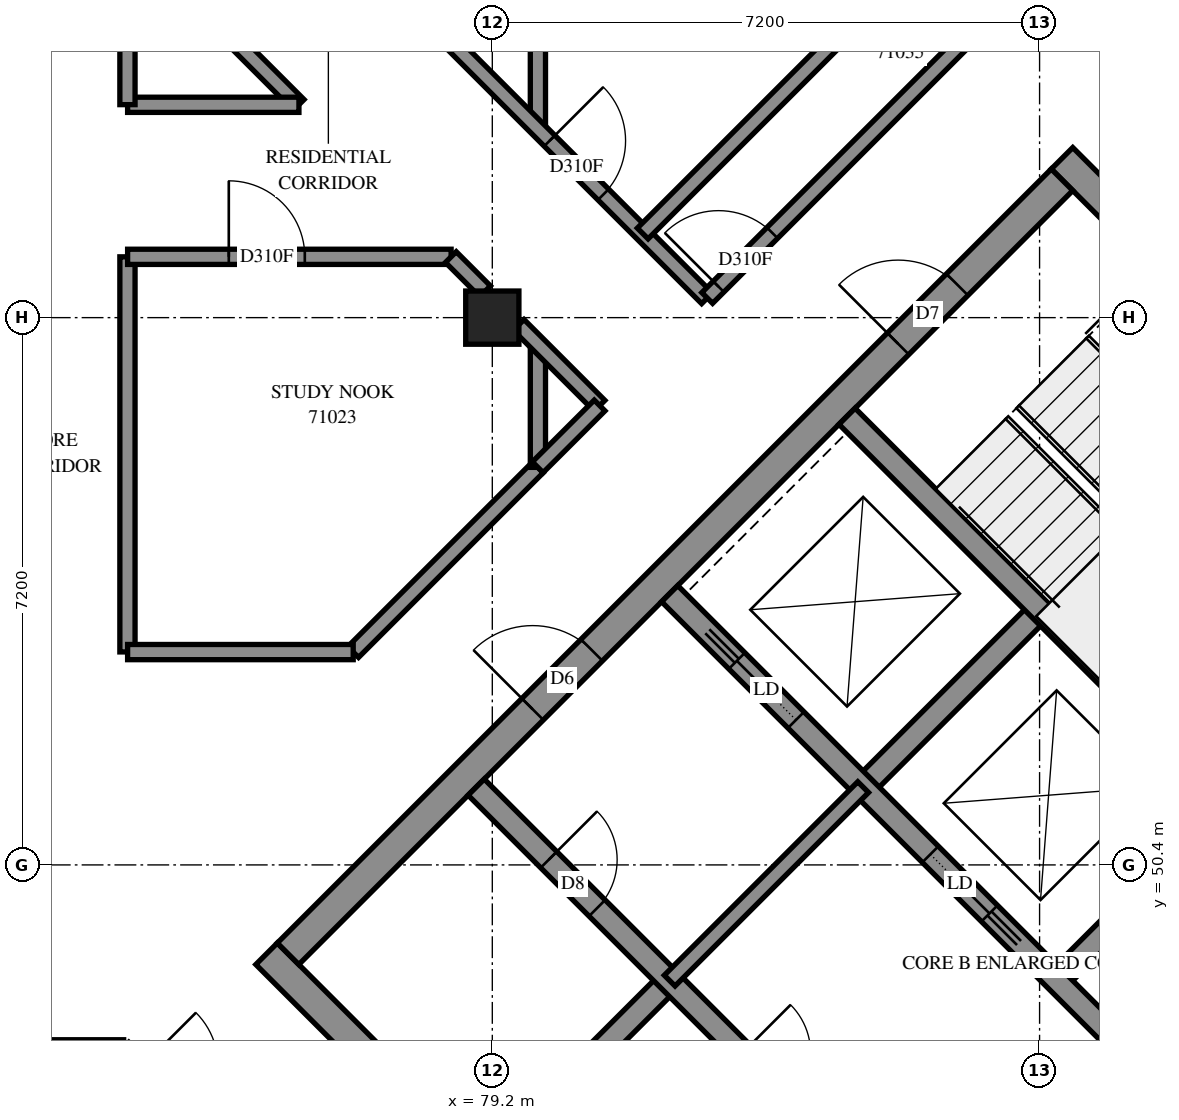
"""IFC4 building model, lengths in metres.
Left out: names, types, materials, properties, quantities, classifications, styles, units other than length and angle.
Written with IfcOpenShell. Run it as: python <this file> out.ifc"""

import sys

from ifc_helpers import new_model, si_unit, direction, frame, frame_2d, origin, origin_2d, place, context, subcontext, project, spatial, rectangle, extrude, element, fill, save


model = new_model("IFC4")
c1 = context("Model", 3, precision=1e-05, world=origin(), true_north=direction((0.0, 1.0)))
c2 = subcontext(c1, "Body", "Model", "MODEL_VIEW")
j1 = project(units=[si_unit("LENGTHUNIT", "METRE"), si_unit("PLANEANGLEUNIT", "RADIAN")], contexts=[c1])
p1 = place(None, origin())
s1 = spatial("IfcSite", under=j1, at=p1, CompositionType="ELEMENT")
p2 = place(p1, origin())
s2 = spatial("IfcBuilding", under=s1, at=p2, CompositionType="ELEMENT")
p3 = place(p2, frame((0.0, 0.0, 260.8)))
s3 = spatial("IfcBuildingStorey", under=s2, at=p3, CompositionType="ELEMENT", Elevation=260.8)
p4 = place(p3, frame((79.2, 57.6, 0.0), z_axis=(0.0, 0.0, 1.0), x_axis=(1.0, 0.0, 0.0)))
e1 = element("IfcColumn", 1, at=p4, inside=s3, PredefinedType="COLUMN", context=c2, shape_type="SweptSolid", body=[
    extrude(rectangle(XDim=0.7, YDim=0.7, at=origin_2d()), origin(), (0.0, 0.0, 1.0), 3.1),
])
p5 = place(p3, frame((76.23, 49.231, -0.3), z_axis=(0.0, 0.0, 1.0), x_axis=(0.7071034917, -0.7071100706, 0.0)))
e2 = element("IfcWall", 2, at=p5, inside=s3, PredefinedType="SHEAR", context=c2, shape_type="SweptSolid", body=[
    extrude(rectangle(XDim=15.2, YDim=0.4, at=frame_2d((7.6, 0.0))), origin(), (0.0, 0.0, 1.0), 2.7),
])
p6 = place(p3, frame((86.695, 59.696, -0.3), z_axis=(0.0, 0.0, 1.0), x_axis=(0.7071100706, -0.7071034917, 0.0)))
e3 = element("IfcWall", 3, at=p6, inside=s3, PredefinedType="SHEAR", context=c2, shape_type="SweptSolid", body=[
    extrude(rectangle(XDim=15.2, YDim=0.4, at=frame_2d((7.6, 0.0))), origin(), (0.0, 0.0, 1.0), 2.7),
])
p7 = place(p6, frame((10.4, 0.0, 0.3)))
e4 = element("IfcOpeningElement", 4, at=p7, cuts=e3, PredefinedType="OPENING", context=c2, shape_type="SweptSolid", body=[
    extrude(rectangle(XDim=0.8, YDim=2.1, at=frame_2d((0.4, 1.05))), frame((0.0, 0.21, 0.0), z_axis=(0.0, -1.0, 0.0), x_axis=(1.0, 0.0, 0.0)), (0.0, 0.0, 1.0), 0.42),
])
p8 = place(p3, frame((76.513, 49.231, -0.3), z_axis=(0.0, 0.0, 1.0), x_axis=(0.7071067812, 0.7071067812, 0.0)))
e5 = element("IfcWall", 5, at=p8, inside=s3, PredefinedType="SHEAR", context=c2, shape_type="SweptSolid", body=[
    extrude(rectangle(XDim=14.4, YDim=0.4, at=frame_2d((7.2, 0.0))), origin(), (0.0, 0.0, 1.0), 2.7),
])
p9 = place(p8, frame((4.55, 0.0, 0.3)))
e6 = element("IfcOpeningElement", 6, at=p9, cuts=e5, PredefinedType="OPENING", context=c2, shape_type="SweptSolid", body=[
    extrude(rectangle(XDim=1.1, YDim=2.1, at=frame_2d((0.55, 1.05))), frame((0.0, 0.21, 0.0), z_axis=(0.0, -1.0, 0.0), x_axis=(1.0, 0.0, 0.0)), (0.0, 0.0, 1.0), 0.42),
])
p10 = place(p8, frame((11.35, 0.0, 0.3)))
e7 = element("IfcOpeningElement", 7, at=p10, cuts=e5, PredefinedType="OPENING", context=c2, shape_type="SweptSolid", body=[
    extrude(rectangle(XDim=1.1, YDim=2.1, at=frame_2d((0.55, 1.05))), frame((0.0, 0.21, 0.0), z_axis=(0.0, -1.0, 0.0), x_axis=(1.0, 0.0, 0.0)), (0.0, 0.0, 1.0), 0.42),
])
p11 = place(p3, frame((86.978, 38.766, -0.3), z_axis=(0.0, 0.0, 1.0), x_axis=(0.7071067812, 0.7071067812, 0.0)))
e8 = element("IfcWall", 8, at=p11, inside=s3, PredefinedType="SHEAR", context=c2, shape_type="SweptSolid", body=[
    extrude(rectangle(XDim=14.4, YDim=0.4, at=frame_2d((7.2, 0.0))), origin(), (0.0, 0.0, 1.0), 2.7),
])
p12 = place(p11, frame((4.55, 0.0, 0.3)))
e9 = element("IfcOpeningElement", 9, at=p12, cuts=e8, PredefinedType="OPENING", context=c2, shape_type="SweptSolid", body=[
    extrude(rectangle(XDim=1.1, YDim=2.1, at=frame_2d((0.55, 1.05))), frame((0.0, 0.21, 0.0), z_axis=(0.0, -1.0, 0.0), x_axis=(1.0, 0.0, 0.0)), (0.0, 0.0, 1.0), 0.42),
])
p13 = place(p11, frame((11.35, 0.0, 0.3)))
e10 = element("IfcOpeningElement", 10, at=p13, cuts=e8, PredefinedType="OPENING", context=c2, shape_type="SweptSolid", body=[
    extrude(rectangle(XDim=1.1, YDim=2.1, at=frame_2d((0.55, 1.05))), frame((0.0, 0.21, 0.0), z_axis=(0.0, -1.0, 0.0), x_axis=(1.0, 0.0, 0.0)), (0.0, 0.0, 1.0), 0.42),
])
for number, where, z_axis, x_axis in (
    (11, (79.2, 46.544, 0.0), (0.0, 0.0, 1.0), (0.707, 0.707, 0.0)),
    (12, (84.079, 51.423, 0.0), (0.0, 0.0, 1.0), (0.707, 0.707, 0.0)),
):
    element("IfcWall", number, at=place(p3, frame(where, z_axis=z_axis, x_axis=x_axis)), inside=s3, PredefinedType="SOLIDWALL", context=c2, shape_type="SweptSolid", body=[
        extrude(rectangle(XDim=3.3, YDim=0.3, at=frame_2d((1.65, 0.0))), origin(), (0.0, 0.0, 1.0), 3.1),
    ])
p14 = place(p3, frame((86.625, 48.878, 0.0), z_axis=(0.0, 0.0, 1.0), x_axis=(0.7071067812, 0.7071067812, 0.0)))
e13 = element("IfcWall", 13, at=p14, inside=s3, PredefinedType="SOLIDWALL", context=c2, shape_type="SweptSolid", body=[
    extrude(rectangle(XDim=3.3, YDim=0.3, at=frame_2d((1.65, 0.0))), origin(), (0.0, 0.0, 1.0), 3.1),
])
p15 = place(p3, frame((78.988, 51.423, 0.0), z_axis=(0.0, 0.0, 1.0), x_axis=(0.7071067812, -0.7071067812, 0.0)))
e14 = element("IfcWall", 14, at=p15, inside=s3, PredefinedType="SOLIDWALL", context=c2, shape_type="SweptSolid", body=[
    extrude(rectangle(XDim=14.4, YDim=0.3, at=frame_2d((7.2, 0.0))), origin(), (0.0, 0.0, 1.0), 3.1),
])
p16 = place(p15, frame((1.35, 0.0, 0.0)))
e15 = element("IfcOpeningElement", 15, at=p16, cuts=e14, PredefinedType="OPENING", context=c2, shape_type="SweptSolid", body=[
    extrude(rectangle(XDim=0.9, YDim=2.1, at=frame_2d((0.45, 1.05))), frame((0.0, 0.16, 0.0), z_axis=(0.0, -1.0, 0.0), x_axis=(1.0, 0.0, 0.0)), (0.0, 0.0, 1.0), 0.32),
])
p17 = place(p15, frame((4.95, 0.0, 0.0)))
e16 = element("IfcOpeningElement", 16, at=p17, cuts=e14, PredefinedType="OPENING", context=c2, shape_type="SweptSolid", body=[
    extrude(rectangle(XDim=0.9, YDim=2.1, at=frame_2d((0.45, 1.05))), frame((0.0, 0.16, 0.0), z_axis=(0.0, -1.0, 0.0), x_axis=(1.0, 0.0, 0.0)), (0.0, 0.0, 1.0), 0.32),
])
p18 = place(p15, frame((8.55, 0.0, 0.0)))
e17 = element("IfcOpeningElement", 17, at=p18, cuts=e14, PredefinedType="OPENING", context=c2, shape_type="SweptSolid", body=[
    extrude(rectangle(XDim=0.9, YDim=2.1, at=frame_2d((0.45, 1.05))), frame((0.0, 0.16, 0.0), z_axis=(0.0, -1.0, 0.0), x_axis=(1.0, 0.0, 0.0)), (0.0, 0.0, 1.0), 0.32),
])
p19 = place(p15, frame((12.05, 0.0, 0.0)))
e18 = element("IfcOpeningElement", 18, at=p19, cuts=e14, PredefinedType="OPENING", context=c2, shape_type="SweptSolid", body=[
    extrude(rectangle(XDim=1.1, YDim=2.1, at=frame_2d((0.55, 1.05))), frame((0.0, 0.16, 0.0), z_axis=(0.0, -1.0, 0.0), x_axis=(1.0, 0.0, 0.0)), (0.0, 0.0, 1.0), 0.32),
])
p20 = place(p3, frame((81.534, 53.969, 0.0), z_axis=(0.0, 0.0, 1.0), x_axis=(0.707103309, -0.7071102534, 0.0)))
e19 = element("IfcWall", 19, at=p20, inside=s3, PredefinedType="SOLIDWALL", context=c2, shape_type="SweptSolid", body=[
    extrude(rectangle(XDim=14.4, YDim=0.3, at=frame_2d((7.2, 0.0))), origin(), (0.0, 0.0, 1.0), 3.1),
])
p21 = place(p20, frame((8.55, 0.0, 0.0)))
e20 = element("IfcOpeningElement", 20, at=p21, cuts=e19, PredefinedType="OPENING", context=c2, shape_type="SweptSolid", body=[
    extrude(rectangle(XDim=0.9, YDim=2.1, at=frame_2d((0.45, 1.05))), frame((0.0, 0.16, 0.0), z_axis=(0.0, -1.0, 0.0), x_axis=(1.0, 0.0, 0.0)), (0.0, 0.0, 1.0), 0.32),
])
p22 = place(p20, frame((1.25, 0.0, 0.0)))
e21 = element("IfcOpeningElement", 21, at=p22, cuts=e19, PredefinedType="OPENING", context=c2, shape_type="SweptSolid", body=[
    extrude(rectangle(XDim=1.1, YDim=2.1, at=frame_2d((0.55, 1.05))), frame((0.0, 0.16, 0.0), z_axis=(0.0, -1.0, 0.0), x_axis=(1.0, 0.0, 0.0)), (0.0, 0.0, 1.0), 0.32),
])
p23 = place(p20, frame((4.85, 0.0, 0.0)))
e22 = element("IfcOpeningElement", 22, at=p23, cuts=e19, PredefinedType="OPENING", context=c2, shape_type="SweptSolid", body=[
    extrude(rectangle(XDim=1.1, YDim=2.1, at=frame_2d((0.55, 1.05))), frame((0.0, 0.16, 0.0), z_axis=(0.0, -1.0, 0.0), x_axis=(1.0, 0.0, 0.0)), (0.0, 0.0, 1.0), 0.32),
])
p24 = place(p20, frame((12.05, 0.0, 0.0)))
e23 = element("IfcOpeningElement", 23, at=p24, cuts=e19, PredefinedType="OPENING", context=c2, shape_type="SweptSolid", body=[
    extrude(rectangle(XDim=1.1, YDim=2.1, at=frame_2d((0.55, 1.05))), frame((0.0, 0.16, 0.0), z_axis=(0.0, -1.0, 0.0), x_axis=(1.0, 0.0, 0.0)), (0.0, 0.0, 1.0), 0.32),
])
p25 = place(p3, frame((83.867, 56.302, 0.0), z_axis=(0.0, 0.0, 1.0), x_axis=(0.7071137256, -0.7070998367, 0.0)))
e24 = element("IfcWall", 24, at=p25, inside=s3, PredefinedType="SOLIDWALL", context=c2, shape_type="SweptSolid", body=[
    extrude(rectangle(XDim=7.2, YDim=0.3, at=frame_2d((3.6, 0.0))), origin(), (0.0, 0.0, 1.0), 3.1),
])
p26 = place(p3, frame((81.534, 48.878, 0.0), z_axis=(0.0, 0.0, 1.0), x_axis=(0.707092892, 0.7071206701, 0.0)))
e25 = element("IfcWall", 25, at=p26, inside=s3, PredefinedType="PARTITIONING", context=c2, shape_type="SweptSolid", body=[
    extrude(rectangle(XDim=3.6, YDim=0.2, at=frame_2d((1.8, 0.0))), origin(), (0.0, 0.0, 1.0), 3.1),
])
p27 = place(p3, frame((55.2, 48.0, 0.0), z_axis=(0.0, 0.0, 1.0), x_axis=(1.0, 0.0, 0.0)))
e26 = element("IfcWall", 26, at=p27, inside=s3, PredefinedType="PARTITIONING", context=c2, shape_type="SweptSolid", body=[
    extrude(rectangle(XDim=19.15, YDim=0.2, at=frame_2d((9.575, 0.0))), origin(), (0.0, 0.0, 1.0), 3.1),
])
p28 = place(p27, frame((6.343, 0.0, 0.0)))
e27 = element("IfcOpeningElement", 27, at=p28, cuts=e26, PredefinedType="OPENING", context=c2, shape_type="SweptSolid", body=[
    extrude(rectangle(XDim=0.9, YDim=2.1, at=frame_2d((0.45, 1.05))), frame((0.0, 0.11, 0.0), z_axis=(0.0, -1.0, 0.0), x_axis=(1.0, 0.0, 0.0)), (0.0, 0.0, 1.0), 0.22),
])
p29 = place(p27, frame((11.633, 0.0, 0.0)))
e28 = element("IfcOpeningElement", 28, at=p29, cuts=e26, PredefinedType="OPENING", context=c2, shape_type="SweptSolid", body=[
    extrude(rectangle(XDim=1.0, YDim=2.1, at=frame_2d((0.5, 1.05))), frame((0.0, 0.11, 0.0), z_axis=(0.0, -1.0, 0.0), x_axis=(1.0, 0.0, 0.0)), (0.0, 0.0, 1.0), 0.22),
])
p30 = place(p27, frame((13.707, 0.0, 0.0)))
e29 = element("IfcOpeningElement", 29, at=p30, cuts=e26, PredefinedType="OPENING", context=c2, shape_type="SweptSolid", body=[
    extrude(rectangle(XDim=1.0, YDim=2.1, at=frame_2d((0.5, 1.05))), frame((0.0, 0.11, 0.0), z_axis=(0.0, -1.0, 0.0), x_axis=(1.0, 0.0, 0.0)), (0.0, 0.0, 1.0), 0.22),
])
p31 = place(p3, frame((79.8, 60.086, 0.0), z_axis=(0.0, 0.0, 1.0), x_axis=(0.0, 1.0, 0.0)))
e30 = element("IfcWall", 30, at=p31, inside=s3, PredefinedType="PARTITIONING", context=c2, shape_type="SweptSolid", body=[
    extrude(rectangle(XDim=12.914, YDim=0.2, at=frame_2d((6.457, 0.0))), origin(), (0.0, 0.0, 1.0), 3.1),
])
p32 = place(p3, frame((74.397, 65.483, 0.0), z_axis=(0.0, 0.0, 1.0), x_axis=(0.7071067812, -0.7071067812, 0.0)))
e31 = element("IfcWall", 31, at=p32, inside=s3, PredefinedType="PARTITIONING", context=c2, shape_type="SweptSolid", body=[
    extrude(rectangle(XDim=10.788, YDim=0.2, at=frame_2d((5.394, 0.0))), origin(), (0.0, 0.0, 1.0), 3.1),
])
p33 = place(p32, frame((5.083, 0.0, 0.0)))
e32 = element("IfcOpeningElement", 32, at=p33, cuts=e31, PredefinedType="OPENING", context=c2, shape_type="SweptSolid", body=[
    extrude(rectangle(XDim=1.0, YDim=2.1, at=frame_2d((0.5, 1.05))), frame((0.0, 0.11, 0.0), z_axis=(0.0, -1.0, 0.0), x_axis=(1.0, 0.0, 0.0)), (0.0, 0.0, 1.0), 0.22),
])
p34 = place(p32, frame((7.858, 0.0, 0.0)))
e33 = element("IfcOpeningElement", 33, at=p34, cuts=e31, PredefinedType="OPENING", context=c2, shape_type="SweptSolid", body=[
    extrude(rectangle(XDim=1.0, YDim=2.1, at=frame_2d((0.5, 1.05))), frame((0.0, 0.11, 0.0), z_axis=(0.0, -1.0, 0.0), x_axis=(1.0, 0.0, 0.0)), (0.0, 0.0, 1.0), 0.22),
])
p35 = place(p3, frame((81.179, 58.707, 0.0), z_axis=(0.0, 0.0, 1.0), x_axis=(0.7071067812, 0.7071067812, 0.0)))
e34 = element("IfcWall", 34, at=p35, inside=s3, PredefinedType="PARTITIONING", context=c2, shape_type="SweptSolid", body=[
    extrude(rectangle(XDim=8.98, YDim=0.2, at=frame_2d((4.49, 0.0))), origin(), (0.0, 0.0, 1.0), 3.1),
])
p36 = place(p3, frame((82.028, 57.858, 0.0), z_axis=(0.0, 0.0, 1.0), x_axis=(0.7071067812, 0.7071067812, 0.0)))
e35 = element("IfcWall", 35, at=p36, inside=s3, PredefinedType="PARTITIONING", context=c2, shape_type="SweptSolid", body=[
    extrude(rectangle(XDim=6.8, YDim=0.2, at=frame_2d((3.4, 0.0))), origin(), (0.0, 0.0, 1.0), 3.1),
])
p37 = place(p36, frame((0.211, 0.0, 0.0)))
e36 = element("IfcOpeningElement", 36, at=p37, cuts=e35, PredefinedType="OPENING", context=c2, shape_type="SweptSolid", body=[
    extrude(rectangle(XDim=1.0, YDim=2.1, at=frame_2d((0.5, 1.05))), frame((0.0, 0.11, 0.0), z_axis=(0.0, -1.0, 0.0), x_axis=(1.0, 0.0, 0.0)), (0.0, 0.0, 1.0), 0.22),
])
p38 = place(p3, frame((74.4, 53.202, 0.0), z_axis=(0.0, 0.0, 1.0), x_axis=(0.0, 1.0, 0.0)))
e37 = element("IfcWall", 37, at=p38, inside=s3, PredefinedType="PARTITIONING", context=c2, shape_type="SweptSolid", body=[
    extrude(rectangle(XDim=5.198, YDim=0.2, at=frame_2d((2.599, 0.0))), origin(), (0.0, 0.0, 1.0), 3.1),
])
p39 = place(p3, frame((74.402, 58.4, 0.0), z_axis=(0.0, 0.0, 1.0), x_axis=(1.0, 0.0, 0.0)))
e38 = element("IfcWall", 38, at=p39, inside=s3, PredefinedType="PARTITIONING", context=c2, shape_type="SweptSolid", body=[
    extrude(rectangle(XDim=4.256, YDim=0.2, at=frame_2d((2.128, 0.0))), origin(), (0.0, 0.0, 1.0), 3.1),
])
p40 = place(p39, frame((1.331, 0.0, 0.0)))
e39 = element("IfcOpeningElement", 39, at=p40, cuts=e38, PredefinedType="OPENING", context=c2, shape_type="SweptSolid", body=[
    extrude(rectangle(XDim=1.0, YDim=2.1, at=frame_2d((0.5, 1.05))), frame((0.0, 0.11, 0.0), z_axis=(0.0, -1.0, 0.0), x_axis=(1.0, 0.0, 0.0)), (0.0, 0.0, 1.0), 0.22),
])
p41 = place(p3, frame((77.37, 53.2, 0.0), z_axis=(0.0, 0.0, 1.0), x_axis=(0.7071067812, 0.7071067812, 0.0)))
e40 = element("IfcWall", 40, at=p41, inside=s3, PredefinedType="PARTITIONING", context=c2, shape_type="SweptSolid", body=[
    extrude(rectangle(XDim=3.437, YDim=0.2, at=frame_2d((1.718, 0.0))), origin(), (0.0, 0.0, 1.0), 3.1),
])
p42 = place(p3, frame((74.399, 62.653, 0.0), z_axis=(0.0, 0.0, 1.0), x_axis=(0.7071067812, -0.7071067812, 0.0)))
e41 = element("IfcWall", 41, at=p42, inside=s3, PredefinedType="PARTITIONING", context=c2, shape_type="SweptSolid", body=[
    extrude(rectangle(XDim=3.188, YDim=0.2, at=frame_2d((1.594, 0.0))), origin(), (0.0, 0.0, 1.0), 3.1),
])
p43 = place(p3, frame((74.402, 53.2, 0.0), z_axis=(0.0, 0.0, 1.0), x_axis=(1.0, 0.0, 0.0)))
e42 = element("IfcWall", 42, at=p43, inside=s3, PredefinedType="PARTITIONING", context=c2, shape_type="SweptSolid", body=[
    extrude(rectangle(XDim=2.968, YDim=0.2, at=frame_2d((1.484, 0.0))), origin(), (0.0, 0.0, 1.0), 3.1),
])
p44 = place(p3, frame((86.833, 62.663, 0.0), z_axis=(0.0, 0.0, 1.0), x_axis=(0.7075233388, -0.706689978, 0.0)))
e43 = element("IfcWall", 43, at=p44, inside=s3, PredefinedType="PARTITIONING", context=c2, shape_type="SweptSolid", body=[
    extrude(rectangle(XDim=2.4, YDim=0.2, at=frame_2d((1.2, 0.0))), origin(), (0.0, 0.0, 1.0), 3.1),
])
for number, where, z_axis, x_axis in (
    (44, (74.402, 60.4, 0.0), (0.0, 0.0, 1.0), (1.0, 0.0, 0.0)),
    (45, (74.4, 60.402, 0.0), (0.0, 0.0, 1.0), (0.0, 1.0, 0.0)),
):
    element("IfcWall", number, at=place(p3, frame(where, z_axis=z_axis, x_axis=x_axis)), inside=s3, PredefinedType="PARTITIONING", context=c2, shape_type="SweptSolid", body=[
        extrude(rectangle(XDim=2.254, YDim=0.2, at=frame_2d((1.127, 0.0))), origin(), (0.0, 0.0, 1.0), 3.1),
    ])
p45 = place(p3, frame((79.8, 55.63, 0.0), z_axis=(0.0, 0.0, 1.0), x_axis=(0.0, 1.0, 0.0)))
e46 = element("IfcWall", 46, at=p45, inside=s3, PredefinedType="PARTITIONING", context=c2, shape_type="SweptSolid", body=[
    extrude(rectangle(XDim=1.628, YDim=0.2, at=frame_2d((0.814, 0.0))), origin(), (0.0, 0.0, 1.0), 3.1),
])
p46 = place(p3, frame((79.547, 57.505, 0.0), z_axis=(0.0, 0.0, 1.0), x_axis=(0.7071067812, -0.7071067812, 0.0)))
e47 = element("IfcWall", 47, at=p46, inside=s3, PredefinedType="PARTITIONING", context=c2, shape_type="SweptSolid", body=[
    extrude(rectangle(XDim=1.505, YDim=0.2, at=frame_2d((0.752, 0.0))), origin(), (0.0, 0.0, 1.0), 3.1),
])
p47 = place(p3, frame((79.798, 55.632, 0.0), z_axis=(0.0, 0.0, 1.0), x_axis=(0.7079759957, 0.7062364969, 0.0)))
e48 = element("IfcWall", 48, at=p47, inside=s3, PredefinedType="PARTITIONING", context=c2, shape_type="SweptSolid", body=[
    extrude(rectangle(XDim=1.15, YDim=0.2, at=frame_2d((0.575, 0.0))), origin(), (0.0, 0.0, 1.0), 3.1),
])
p48 = place(p3, frame((78.655, 58.397, 0.0), z_axis=(0.0, 0.0, 1.0), x_axis=(0.7071067812, -0.7071067812, 0.0)))
e49 = element("IfcWall", 49, at=p48, inside=s3, PredefinedType="PARTITIONING", context=c2, shape_type="SweptSolid", body=[
    extrude(rectangle(XDim=0.636, YDim=0.2, at=frame_2d((0.318, 0.0))), origin(), (0.0, 0.0, 1.0), 3.1),
])
p49 = place(p9, origin())
e50 = element("IfcDoor", 50, at=p49, inside=s3, OperationType="DOUBLE_DOOR_SINGLE_SWING", PredefinedType="DOOR", context=c2, shape_type="SweptSolid", body=[
    extrude(rectangle(XDim=1.1, YDim=2.1, at=frame_2d((0.55, 1.05))), frame((0.0, 0.025, 0.0), z_axis=(0.0, -1.0, 0.0), x_axis=(1.0, 0.0, 0.0)), (0.0, 0.0, 1.0), 0.05),
])
fill(e6, e50)
p50 = place(p10, origin())
e51 = element("IfcDoor", 51, at=p50, inside=s3, OperationType="SINGLE_SWING_LEFT", PredefinedType="DOOR", context=c2, shape_type="SweptSolid", body=[
    extrude(rectangle(XDim=1.1, YDim=2.1, at=frame_2d((0.55, 1.05))), frame((0.0, 0.025, 0.0), z_axis=(0.0, -1.0, 0.0), x_axis=(1.0, 0.0, 0.0)), (0.0, 0.0, 1.0), 0.05),
])
fill(e7, e51)
p51 = place(p16, origin())
e52 = element("IfcDoor", 52, at=p51, inside=s3, OperationType="SINGLE_SWING_LEFT", PredefinedType="DOOR", context=c2, shape_type="SweptSolid", body=[
    extrude(rectangle(XDim=0.9, YDim=2.1, at=frame_2d((0.45, 1.05))), frame((0.0, 0.025, 0.0), z_axis=(0.0, -1.0, 0.0), x_axis=(1.0, 0.0, 0.0)), (0.0, 0.0, 1.0), 0.05),
])
fill(e15, e52)
p52 = place(p22, origin())
e53 = element("IfcDoor", 53, at=p52, inside=s3, OperationType="SLIDING_TO_LEFT", PredefinedType="DOOR", context=c2, shape_type="SweptSolid", body=[
    extrude(rectangle(XDim=1.1, YDim=2.1, at=frame_2d((0.55, 1.05))), frame((0.0, 0.025, 0.0), z_axis=(0.0, -1.0, 0.0), x_axis=(1.0, 0.0, 0.0)), (0.0, 0.0, 1.0), 0.05),
])
fill(e21, e53)
p53 = place(p23, origin())
e54 = element("IfcDoor", 54, at=p53, inside=s3, OperationType="SLIDING_TO_RIGHT", PredefinedType="DOOR", context=c2, shape_type="SweptSolid", body=[
    extrude(rectangle(XDim=1.1, YDim=2.1, at=frame_2d((0.55, 1.05))), frame((0.0, 0.025, 0.0), z_axis=(0.0, -1.0, 0.0), x_axis=(1.0, 0.0, 0.0)), (0.0, 0.0, 1.0), 0.05),
])
fill(e22, e54)
p54 = place(p40, origin())
e55 = element("IfcDoor", 55, at=p54, inside=s3, OperationType="SINGLE_SWING_RIGHT", PredefinedType="DOOR", context=c2, shape_type="SweptSolid", body=[
    extrude(rectangle(XDim=1.0, YDim=2.1, at=frame_2d((0.5, 1.05))), frame((0.0, 0.025, 0.0), z_axis=(0.0, -1.0, 0.0), x_axis=(1.0, 0.0, 0.0)), (0.0, 0.0, 1.0), 0.05),
])
fill(e39, e55)
p55 = place(p34, origin())
e56 = element("IfcDoor", 56, at=p55, inside=s3, OperationType="SINGLE_SWING_LEFT", PredefinedType="DOOR", context=c2, shape_type="SweptSolid", body=[
    extrude(rectangle(XDim=1.0, YDim=2.1, at=frame_2d((0.5, 1.05))), frame((0.0, 0.025, 0.0), z_axis=(0.0, -1.0, 0.0), x_axis=(1.0, 0.0, 0.0)), (0.0, 0.0, 1.0), 0.05),
])
fill(e33, e56)
p56 = place(p37, origin())
e57 = element("IfcDoor", 57, at=p56, inside=s3, OperationType="SINGLE_SWING_RIGHT", PredefinedType="DOOR", context=c2, shape_type="SweptSolid", body=[
    extrude(rectangle(XDim=1.0, YDim=2.1, at=frame_2d((0.5, 1.05))), frame((0.0, 0.025, 0.0), z_axis=(0.0, -1.0, 0.0), x_axis=(1.0, 0.0, 0.0)), (0.0, 0.0, 1.0), 0.05),
])
fill(e36, e57)
save(model, sys.argv[1])
